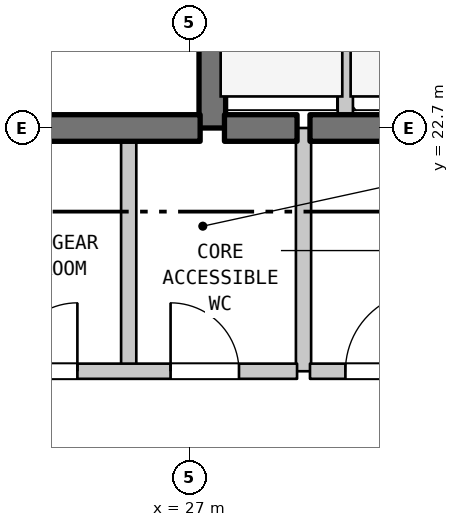
"""IFC4 building model, lengths in metres.
Left out: names, types, materials, properties, quantities, classifications, styles, units other than length and angle.
Written with IfcOpenShell. Run it as: python <this file> out.ifc"""

import sys

from ifc_helpers import new_model, si_unit, direction, frame, frame_2d, origin, place, context, subcontext, project, spatial, rectangle, extrude, element, fill, save


model = new_model("IFC4")
c1 = context("Model", 3, precision=1e-05, world=origin(), true_north=direction((0.0, 1.0)))
c2 = subcontext(c1, "Body", "Model", "MODEL_VIEW")
j1 = project(units=[si_unit("LENGTHUNIT", "METRE"), si_unit("PLANEANGLEUNIT", "RADIAN")], contexts=[c1])
p1 = place(None, origin())
s1 = spatial("IfcSite", under=j1, at=p1, CompositionType="ELEMENT")
p2 = place(p1, origin())
s2 = spatial("IfcBuilding", under=s1, at=p2, CompositionType="ELEMENT")
p3 = place(p2, frame((0.0, 0.0, 49.9)))
s3 = spatial("IfcBuildingStorey", under=s2, at=p3, CompositionType="ELEMENT", Elevation=49.9)
p4 = place(p3, frame((26.2, 19.5, 0.0), z_axis=(0.0, 0.0, 1.0), x_axis=(0.0, 1.0, 0.0)))
e1 = element("IfcWall", 1, at=p4, inside=s3, PredefinedType="STANDARD", context=c2, shape_type="SweptSolid", body=[
    extrude(rectangle(XDim=3.2, YDim=0.2, at=frame_2d((1.6, 0.0))), origin(), (0.0, 0.0, 1.0), 3.385),
])
p5 = place(p3, frame((27.3, 22.7, 0.0), z_axis=(0.0, 0.0, 1.0), x_axis=(0.0, 1.0, 0.0)))
e2 = element("IfcWall", 2, at=p5, inside=s3, PredefinedType="SHEAR", context=c2, shape_type="SweptSolid", body=[
    extrude(rectangle(XDim=2.9, YDim=0.35, at=frame_2d((1.45, 0.0))), origin(), (0.0, 0.0, 1.0), 3.385),
])
p6 = place(p3, frame((28.5, 19.5, 0.0), z_axis=(0.0, 0.0, 1.0), x_axis=(0.0, 1.0, 0.0)))
e3 = element("IfcWall", 3, at=p6, inside=s3, PredefinedType="STANDARD", context=c2, shape_type="SweptSolid", body=[
    extrude(rectangle(XDim=3.2, YDim=0.2, at=frame_2d((1.6, 0.0))), origin(), (0.0, 0.0, 1.0), 3.385),
])
p7 = place(p3, frame((29.05, 22.7, 0.0), z_axis=(0.0, 0.0, 1.0), x_axis=(0.0, 1.0, 0.0)))
e4 = element("IfcWall", 4, at=p7, inside=s3, PredefinedType="STANDARD", context=c2, shape_type="SweptSolid", body=[
    extrude(rectangle(XDim=2.9, YDim=0.2, at=frame_2d((1.45, 0.0))), origin(), (0.0, 0.0, 1.0), 3.385),
])
p8 = place(p3, frame((23.96, 19.5, 0.0), z_axis=(0.0, 0.0, 1.0), x_axis=(1.0, 0.0, 0.0)))
e5 = element("IfcWall", 5, at=p8, inside=s3, PredefinedType="STANDARD", context=c2, shape_type="SweptSolid", body=[
    extrude(rectangle(XDim=4.455, YDim=0.2, at=frame_2d((2.228, 0.0))), origin(), (0.0, 0.0, 1.0), 3.385),
])
p9 = place(p8, frame((0.665, 0.0, 0.0)))
e6 = element("IfcOpeningElement", 6, at=p9, cuts=e5, PredefinedType="OPENING", context=c2, shape_type="SweptSolid", body=[
    extrude(rectangle(XDim=0.9, YDim=2.15, at=frame_2d((0.45, 1.075))), frame((0.0, 0.11, 0.0), z_axis=(0.0, -1.0, 0.0), x_axis=(1.0, 0.0, 0.0)), (0.0, 0.0, 1.0), 0.22),
])
p10 = place(p8, frame((2.791, 0.0, 0.0)))
e7 = element("IfcOpeningElement", 7, at=p10, cuts=e5, PredefinedType="OPENING", context=c2, shape_type="SweptSolid", body=[
    extrude(rectangle(XDim=0.9, YDim=2.15, at=frame_2d((0.45, 1.075))), frame((0.0, 0.11, 0.0), z_axis=(0.0, -1.0, 0.0), x_axis=(1.0, 0.0, 0.0)), (0.0, 0.0, 1.0), 0.22),
])
p11 = place(p3, frame((28.585, 19.5, 0.0), z_axis=(0.0, 0.0, 1.0), x_axis=(1.0, 0.0, 0.0)))
e8 = element("IfcWall", 8, at=p11, inside=s3, PredefinedType="STANDARD", context=c2, shape_type="SweptSolid", body=[
    extrude(rectangle(XDim=2.055, YDim=0.2, at=frame_2d((1.027, 0.0))), origin(), (0.0, 0.0, 1.0), 3.385),
])
p12 = place(p11, frame((0.466, 0.0, 0.0)))
e9 = element("IfcOpeningElement", 9, at=p12, cuts=e8, PredefinedType="OPENING", context=c2, shape_type="SweptSolid", body=[
    extrude(rectangle(XDim=1.05, YDim=2.15, at=frame_2d((0.525, 1.075))), frame((0.0, 0.11, 0.0), z_axis=(0.0, -1.0, 0.0), x_axis=(1.0, 0.0, 0.0)), (0.0, 0.0, 1.0), 0.22),
])
p13 = place(p3, frame((23.96, 22.7, 0.0), z_axis=(0.0, 0.0, 1.0), x_axis=(1.0, 0.0, 0.0)))
e10 = element("IfcWall", 10, at=p13, inside=s3, PredefinedType="SHEAR", context=c2, shape_type="SweptSolid", body=[
    extrude(rectangle(XDim=3.18, YDim=0.35, at=frame_2d((1.59, 0.0))), origin(), (0.0, 0.0, 1.0), 3.385),
])
p14 = place(p3, frame((27.46, 22.7, 0.0), z_axis=(0.0, 0.0, 1.0), x_axis=(1.0, 0.0, 0.0)))
e11 = element("IfcWall", 11, at=p14, inside=s3, PredefinedType="SHEAR", context=c2, shape_type="SweptSolid", body=[
    extrude(rectangle(XDim=0.955, YDim=0.35, at=frame_2d((0.478, 0.0))), origin(), (0.0, 0.0, 1.0), 3.385),
])
p15 = place(p3, frame((28.585, 22.7, 0.0), z_axis=(0.0, 0.0, 1.0), x_axis=(1.0, 0.0, 0.0)))
e12 = element("IfcWall", 12, at=p15, inside=s3, PredefinedType="SHEAR", context=c2, shape_type="SweptSolid", body=[
    extrude(rectangle(XDim=2.055, YDim=0.35, at=frame_2d((1.027, 0.0))), origin(), (0.0, 0.0, 1.0), 3.385),
])
p16 = place(p9, origin())
e13 = element("IfcDoor", 13, at=p16, inside=s3, OperationType="SINGLE_SWING_RIGHT", PredefinedType="DOOR", context=c2, shape_type="SweptSolid", body=[
    extrude(rectangle(XDim=0.9, YDim=2.15, at=frame_2d((0.45, 1.075))), frame((0.0, 0.025, 0.0), z_axis=(0.0, -1.0, 0.0), x_axis=(1.0, 0.0, 0.0)), (0.0, 0.0, 1.0), 0.05),
])
fill(e6, e13)
p17 = place(p10, origin())
e14 = element("IfcDoor", 14, at=p17, inside=s3, OperationType="SINGLE_SWING_LEFT", PredefinedType="DOOR", context=c2, shape_type="SweptSolid", body=[
    extrude(rectangle(XDim=0.9, YDim=2.15, at=frame_2d((0.45, 1.075))), frame((0.0, 0.025, 0.0), z_axis=(0.0, -1.0, 0.0), x_axis=(1.0, 0.0, 0.0)), (0.0, 0.0, 1.0), 0.05),
])
fill(e7, e14)
p18 = place(p12, origin())
e15 = element("IfcDoor", 15, at=p18, inside=s3, OperationType="SINGLE_SWING_RIGHT", PredefinedType="DOOR", context=c2, shape_type="SweptSolid", body=[
    extrude(rectangle(XDim=1.05, YDim=2.15, at=frame_2d((0.525, 1.075))), frame((0.0, 0.025, 0.0), z_axis=(0.0, -1.0, 0.0), x_axis=(1.0, 0.0, 0.0)), (0.0, 0.0, 1.0), 0.05),
])
fill(e9, e15)
save(model, sys.argv[1])
